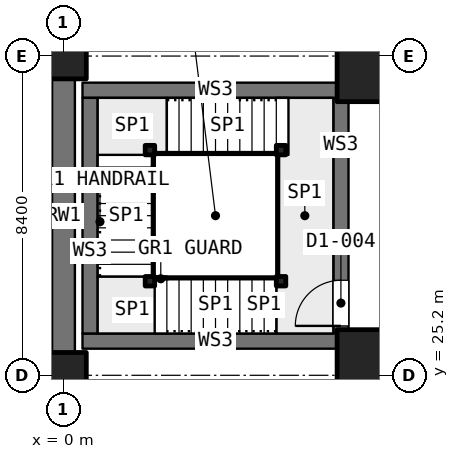
"""IFC4 building model, lengths in metres.
Left out: names, types, materials, properties, quantities, classifications, styles, units other than length and angle.
Written with IfcOpenShell. Run it as: python <this file> out.ifc"""

import sys

from ifc_helpers import new_model, si_unit, direction, frame, frame_2d, origin, origin_2d, place, context, subcontext, project, spatial, rectangle, extrude, element, fill, save


model = new_model("IFC4")
c1 = context("Model", 3, precision=1e-05, world=origin(), true_north=direction((0.0, 1.0)))
c2 = subcontext(c1, "Body", "Model", "MODEL_VIEW")
j1 = project(units=[si_unit("LENGTHUNIT", "METRE"), si_unit("PLANEANGLEUNIT", "RADIAN")], contexts=[c1])
p1 = place(None, origin())
s1 = spatial("IfcSite", under=j1, at=p1, CompositionType="ELEMENT")
p2 = place(p1, origin())
s2 = spatial("IfcBuilding", under=s1, at=p2, CompositionType="ELEMENT")
p3 = place(p2, frame((0.0, 0.0, -9.9)))
s3 = spatial("IfcBuildingStorey", under=s2, at=p3, CompositionType="ELEMENT", Elevation=-9.9)
for number, where, z_axis, x_axis in (
    (1, (0.0, 25.2, 0.0), (0.0, 0.0, 1.0), (1.0, 0.0, 0.0)),
    (2, (0.0, 33.6, 0.0), (0.0, 0.0, 1.0), (1.0, 0.0, 0.0)),
):
    element("IfcColumn", number, at=place(p3, frame(where, z_axis=z_axis, x_axis=x_axis)), inside=s3, PredefinedType="COLUMN", context=c2, shape_type="SweptSolid", body=[
        extrude(rectangle(XDim=1.2, YDim=1.2, at=origin_2d()), origin(), (0.0, 0.0, 1.0), 4.5),
    ])
for number, where, z_axis, x_axis in (
    (3, (8.4, 25.2, 0.0), (0.0, 0.0, 1.0), (1.0, 0.0, 0.0)),
    (4, (8.4, 33.6, 0.0), (0.0, 0.0, 1.0), (1.0, 0.0, 0.0)),
):
    element("IfcColumn", number, at=place(p3, frame(where, z_axis=z_axis, x_axis=x_axis)), inside=s3, PredefinedType="COLUMN", context=c2, shape_type="SweptSolid", body=[
        extrude(rectangle(XDim=2.4, YDim=2.4, at=origin_2d()), origin(), (0.0, 0.0, 1.0), 4.5),
    ])
p4 = place(p3, frame((0.0, 25.8, 0.0), z_axis=(0.0, 0.0, 1.0), x_axis=(0.0, 1.0, 0.0)))
e5 = element("IfcWall", 5, at=p4, inside=s3, PredefinedType="SOLIDWALL", context=c2, shape_type="SweptSolid", body=[
    extrude(rectangle(XDim=7.2, YDim=0.6, at=frame_2d((3.6, 0.0))), origin(), (0.0, 0.0, 1.0), 4.2),
])
for number, where, z_axis, x_axis in (
    (6, (0.5, 26.1, 0.0), (0.0, 0.0, 1.0), (1.0, 0.0, 0.0)),
    (7, (0.5, 32.7, 0.0), (0.0, 0.0, 1.0), (1.0, 0.0, 0.0)),
):
    element("IfcWall", number, at=place(p3, frame(where, z_axis=z_axis, x_axis=x_axis)), inside=s3, PredefinedType="SOLIDWALL", context=c2, shape_type="SweptSolid", body=[
        extrude(rectangle(XDim=7.0, YDim=0.4, at=frame_2d((3.5, 0.0))), origin(), (0.0, 0.0, 1.0), 4.2),
    ])
p5 = place(p3, frame((0.7, 26.3, 0.0), z_axis=(0.0, 0.0, 1.0), x_axis=(0.0, 1.0, 0.0)))
e8 = element("IfcWall", 8, at=p5, inside=s3, PredefinedType="SOLIDWALL", context=c2, shape_type="SweptSolid", body=[
    extrude(rectangle(XDim=6.2, YDim=0.4, at=frame_2d((3.1, 0.0))), origin(), (0.0, 0.0, 1.0), 4.2),
])
p6 = place(p3, frame((7.3, 26.3, 0.0), z_axis=(0.0, 0.0, 1.0), x_axis=(0.0, 1.0, 0.0)))
e9 = element("IfcWall", 9, at=p6, inside=s3, PredefinedType="SOLIDWALL", context=c2, shape_type="SweptSolid", body=[
    extrude(rectangle(XDim=6.2, YDim=0.4, at=frame_2d((3.1, 0.0))), origin(), (0.0, 0.0, 1.0), 4.2),
])
p7 = place(p6, frame((0.2, 0.0, 0.0)))
e10 = element("IfcOpeningElement", 10, at=p7, cuts=e9, PredefinedType="OPENING", context=c2, shape_type="SweptSolid", body=[
    extrude(rectangle(XDim=1.2, YDim=2.1, at=frame_2d((0.6, 1.05))), frame((0.0, 0.21, 0.0), z_axis=(0.0, -1.0, 0.0), x_axis=(1.0, 0.0, 0.0)), (0.0, 0.0, 1.0), 0.42),
])
for number, where, z_axis, x_axis in (
    (11, (5.725, 27.675, 0.0), (0.0, 0.0, 1.0), (1.0, 0.0, 0.0)),
    (12, (2.275, 27.675, 0.0), (0.0, 0.0, 1.0), (1.0, 0.0, 0.0)),
    (13, (2.275, 31.125, 0.0), (0.0, 0.0, 1.0), (1.0, 0.0, 0.0)),
    (14, (5.725, 31.125, 0.0), (0.0, 0.0, 1.0), (1.0, 0.0, 0.0)),
):
    element("IfcColumn", number, at=place(p3, frame(where, z_axis=z_axis, x_axis=x_axis)), inside=s3, PredefinedType="COLUMN", context=c2, shape_type="SweptSolid", body=[
        extrude(rectangle(XDim=0.25, YDim=0.25, at=origin_2d()), origin(), (0.0, 0.0, 1.0), 4.5),
    ])
p8 = place(p7, origin())
e15 = element("IfcDoor", 15, at=p8, inside=s3, OperationType="SINGLE_SWING_RIGHT", PredefinedType="DOOR", context=c2, shape_type="SweptSolid", body=[
    extrude(rectangle(XDim=1.2, YDim=2.1, at=frame_2d((0.6, 1.05))), frame((0.0, 0.025, 0.0), z_axis=(0.0, -1.0, 0.0), x_axis=(1.0, 0.0, 0.0)), (0.0, 0.0, 1.0), 0.05),
])
fill(e10, e15)
save(model, sys.argv[1])
